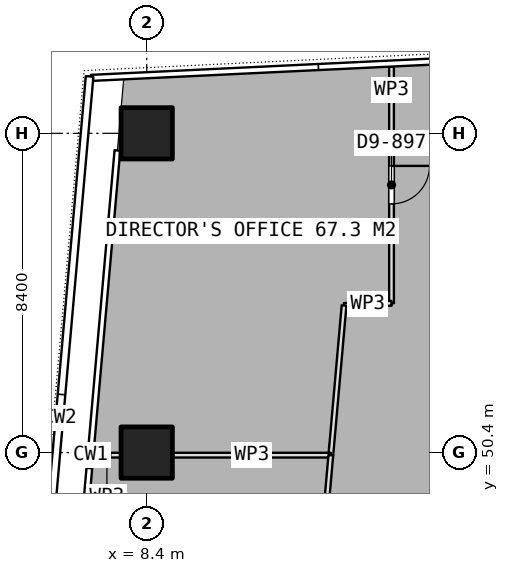
"""IFC4 building model, lengths in metres.
Left out: names, types, materials, properties, quantities, classifications, styles, units other than length and angle.
Written with IfcOpenShell. Run it as: python <this file> out.ifc"""

import sys

from ifc_helpers import new_model, si_unit, direction, frame, frame_2d, origin, origin_2d, place, context, subcontext, project, spatial, rectangle, extrude, element, fill, save


model = new_model("IFC4")
c1 = context("Model", 3, precision=1e-05, world=origin(), true_north=direction((0.0, 1.0)))
c2 = subcontext(c1, "Body", "Model", "MODEL_VIEW")
j1 = project(units=[si_unit("LENGTHUNIT", "METRE"), si_unit("PLANEANGLEUNIT", "RADIAN")], contexts=[c1])
p1 = place(None, origin())
s1 = spatial("IfcSite", under=j1, at=p1, CompositionType="ELEMENT")
p2 = place(p1, origin())
s2 = spatial("IfcBuilding", under=s1, at=p2, CompositionType="ELEMENT")
p3 = place(p2, frame((0.0, 0.0, 225.2)))
s3 = spatial("IfcBuildingStorey", under=s2, at=p3, CompositionType="ELEMENT", Elevation=225.2)
for number, where, z_axis, x_axis in (
    (1, (8.4, 50.4, 0.0), (0.0, 0.0, 1.0), (1.0, 0.0, 0.0)),
    (2, (8.4, 58.8, 0.0), (0.0, 0.0, 1.0), (1.0, 0.0, 0.0)),
):
    element("IfcColumn", number, at=place(p3, frame(where, z_axis=z_axis, x_axis=x_axis)), inside=s3, PredefinedType="COLUMN", context=c2, shape_type="SweptSolid", body=[
        extrude(rectangle(XDim=1.35, YDim=1.35, at=origin_2d()), origin(), (0.0, 0.0, 1.0), 3.75),
    ])
p4 = place(p3, frame((14.842, 60.557, 0.0), z_axis=(0.0, 0.0, 1.0), x_axis=(0.0, -1.0, 0.0)))
e3 = element("IfcWall", 3, at=p4, inside=s3, PredefinedType="PARTITIONING", context=c2, shape_type="SweptSolid", body=[
    extrude(rectangle(XDim=6.228, YDim=0.125, at=frame_2d((3.114, 0.0))), origin(), (0.0, 0.0, 1.0), 3.5),
])
p5 = place(p4, frame((2.614, 0.0, 0.0)))
e4 = element("IfcOpeningElement", 4, at=p5, cuts=e3, PredefinedType="OPENING", context=c2, shape_type="SweptSolid", body=[
    extrude(rectangle(XDim=1.0, YDim=2.1, at=frame_2d((0.5, 1.05))), frame((0.0, 0.073, 0.0), z_axis=(0.0, -1.0, 0.0), x_axis=(1.0, 0.0, 0.0)), (0.0, 0.0, 1.0), 0.145),
])
p6 = place(p3, frame((14.842, 54.329, 0.0), z_axis=(0.0, 0.0, 1.0), x_axis=(-0.998883106922, -0.047249748216, 0.0)))
e5 = element("IfcWall", 5, at=p6, inside=s3, PredefinedType="PARTITIONING", context=c2, shape_type="SweptSolid", body=[
    extrude(rectangle(XDim=1.25, YDim=0.125, at=frame_2d((0.625, 0.0))), origin(), (0.0, 0.0, 1.0), 3.5),
])
p7 = place(p3, frame((13.593, 54.27, 0.0), z_axis=(0.0, 0.0, 1.0), x_axis=(-0.088001948608, -0.996120302494, 0.0)))
e6 = element("IfcWall", 6, at=p7, inside=s3, PredefinedType="PARTITIONING", context=c2, shape_type="SweptSolid", body=[
    extrude(rectangle(XDim=3.953, YDim=0.125, at=frame_2d((1.977, 0.0))), origin(), (0.0, 0.0, 1.0), 3.5),
])
p8 = place(p3, frame((13.245, 50.332, 0.0), z_axis=(0.0, 0.0, 1.0), x_axis=(-1.0, 0.0, 0.0)))
e7 = element("IfcWall", 7, at=p8, inside=s3, PredefinedType="PARTITIONING", context=c2, shape_type="SweptSolid", body=[
    extrude(rectangle(XDim=4.15, YDim=0.125, at=frame_2d((2.075, 0.0))), origin(), (0.0, 0.0, 1.0), 3.5),
])
p9 = place(p3, frame((7.705, 50.332, 0.0), z_axis=(0.0, 0.0, 1.0), x_axis=(-1.0, 0.0, 0.0)))
e8 = element("IfcWall", 8, at=p9, inside=s3, PredefinedType="PARTITIONING", context=c2, shape_type="SweptSolid", body=[
    extrude(rectangle(XDim=0.704, YDim=0.125, at=frame_2d((0.352, 0.0))), origin(), (0.0, 0.0, 1.0), 3.5),
])
p10 = place(p3, frame((13.245, 50.331, 0.0), z_axis=(0.0, 0.0, 1.0), x_axis=(-0.087903511106, -0.996128994024, 0.0)))
e9 = element("IfcWall", 9, at=p10, inside=s3, PredefinedType="PARTITIONING", context=c2, shape_type="SweptSolid", body=[
    extrude(rectangle(XDim=8.079, YDim=0.125, at=frame_2d((4.04, 0.0))), origin(), (0.0, 0.0, 1.0), 3.5),
])
p11 = place(p10, frame((3.14, 0.0, 0.0)))
e10 = element("IfcOpeningElement", 10, at=p11, cuts=e9, PredefinedType="OPENING", context=c2, shape_type="SweptSolid", body=[
    extrude(rectangle(XDim=1.8, YDim=2.1, at=frame_2d((0.9, 1.05))), frame((0.0, 0.073, 0.0), z_axis=(0.0, -1.0, 0.0), x_axis=(1.0, 0.0, 0.0)), (0.0, 0.0, 1.0), 0.145),
])
p12 = place(p5, origin())
e11 = element("IfcDoor", 11, at=p12, inside=s3, OperationType="SINGLE_SWING_LEFT", PredefinedType="DOOR", context=c2, shape_type="SweptSolid", body=[
    extrude(rectangle(XDim=1.0, YDim=2.1, at=frame_2d((0.5, 1.05))), frame((0.0, 0.025, 0.0), z_axis=(0.0, -1.0, 0.0), x_axis=(1.0, 0.0, 0.0)), (0.0, 0.0, 1.0), 0.05),
])
fill(e4, e11)
save(model, sys.argv[1])
